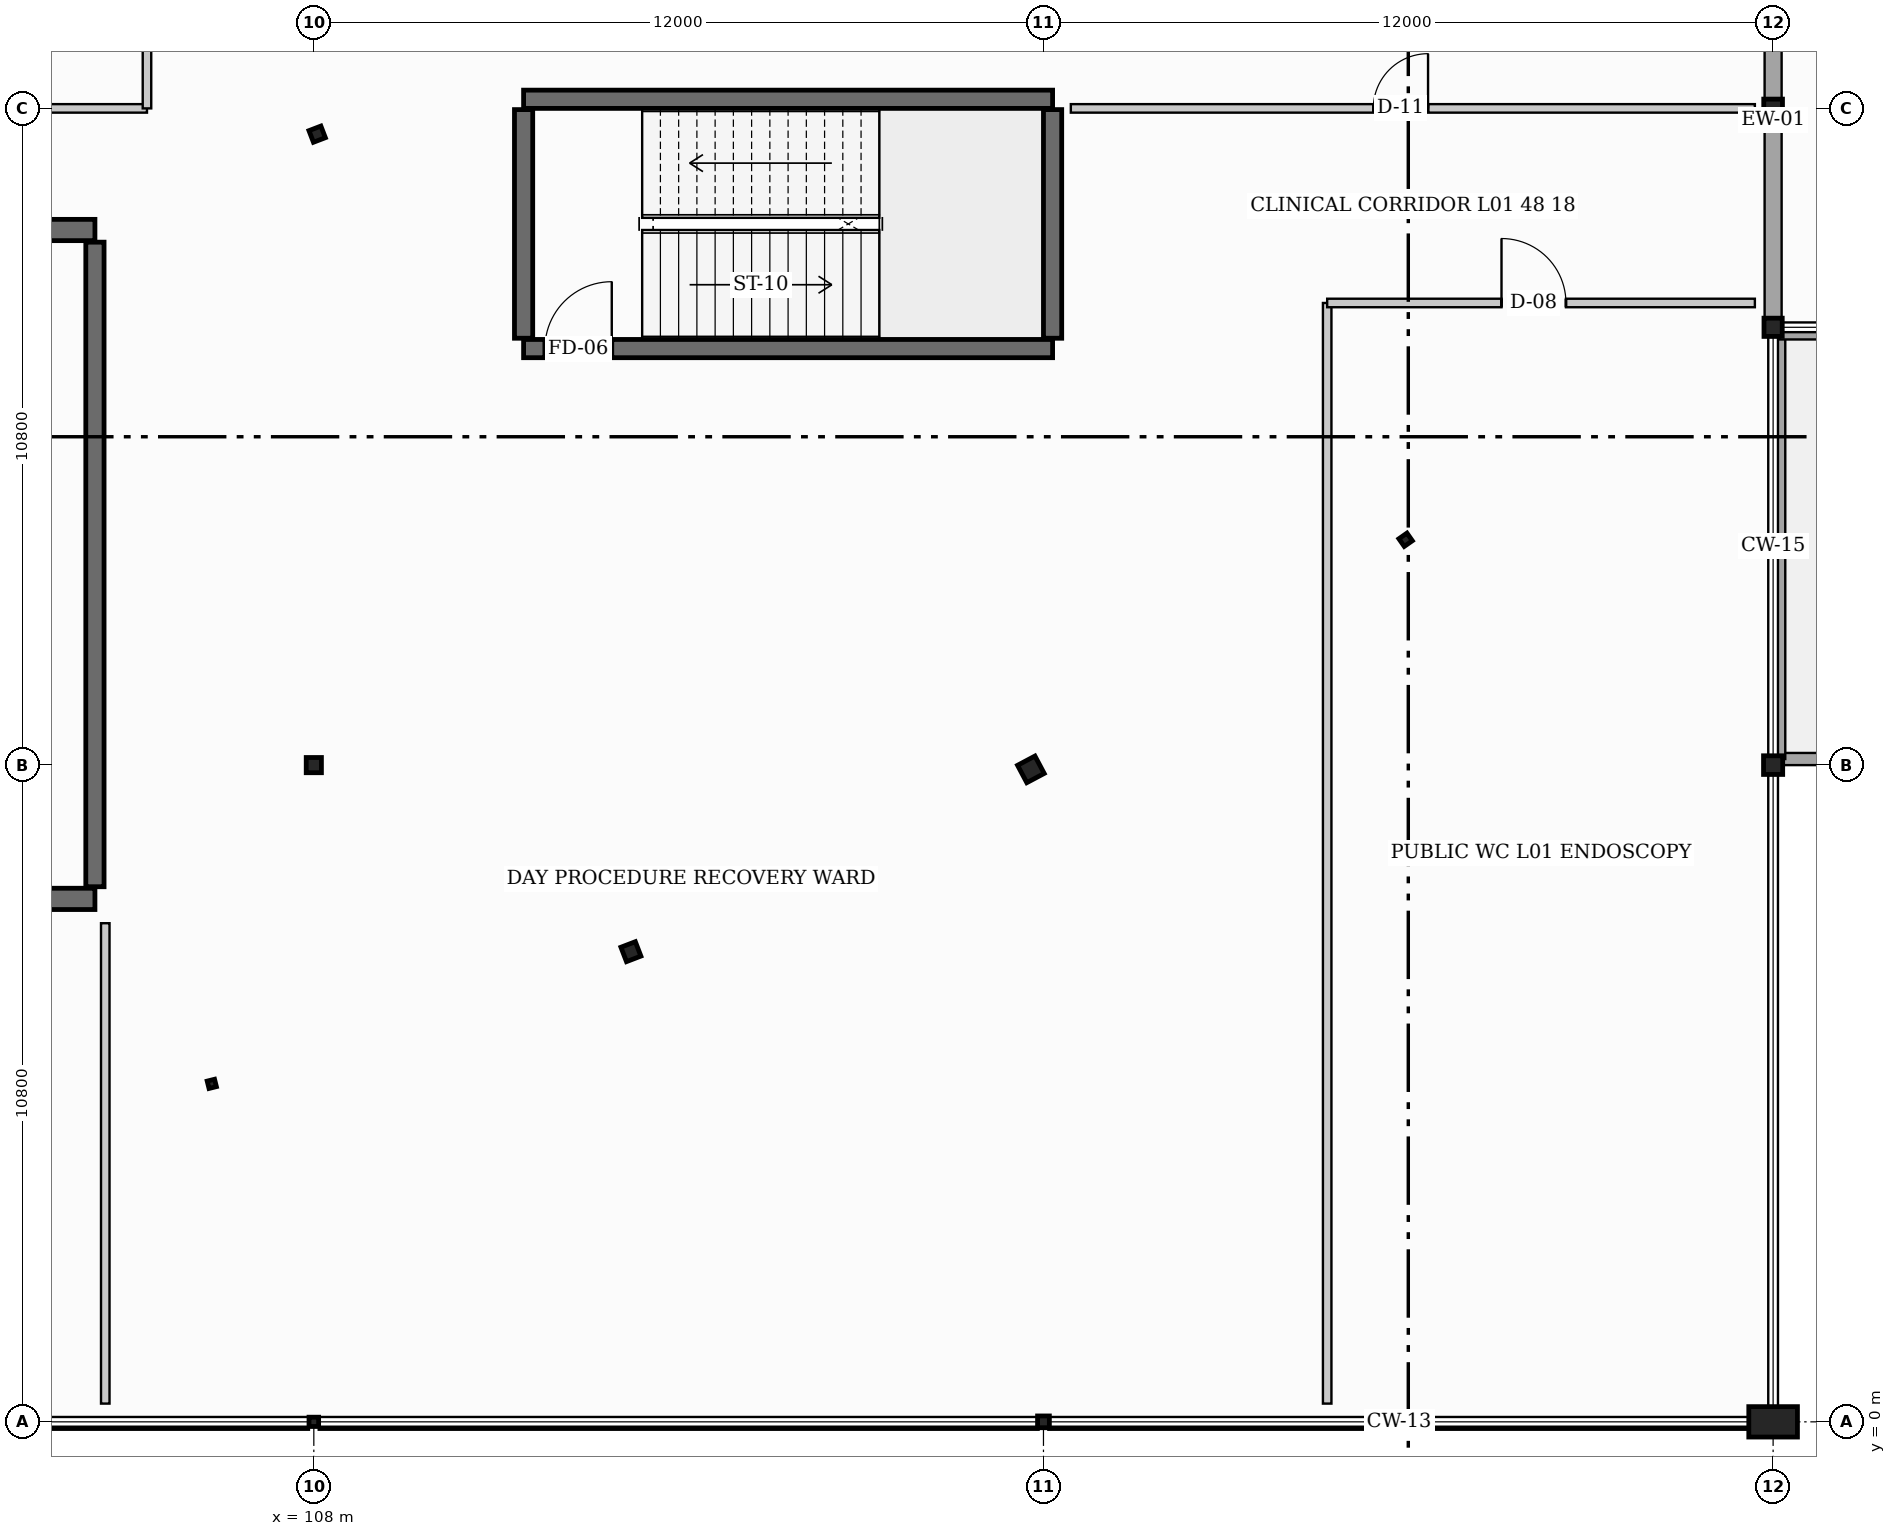
"""IFC4 building model, lengths in metres.
Left out: names, types, materials, properties, quantities, classifications, styles, units other than length and angle.
Written with IfcOpenShell. Run it as: python <this file> out.ifc"""

import sys

from ifc_helpers import new_model, si_unit, direction, frame, frame_2d, origin, origin_2d, place, context, subcontext, project, spatial, rectangle, hollow_rectangle, hollow_circle, i_section, extrude, element, fill, save


model = new_model("IFC4")
c1 = context("Model", 3, precision=1e-05, world=origin(), true_north=direction((0.0, 1.0)))
c2 = subcontext(c1, "Body", "Model", "MODEL_VIEW")
j1 = project(units=[si_unit("LENGTHUNIT", "METRE"), si_unit("PLANEANGLEUNIT", "RADIAN")], contexts=[c1])
p1 = place(None, origin())
s1 = spatial("IfcSite", under=j1, at=p1, CompositionType="ELEMENT")
p2 = place(p1, origin())
s2 = spatial("IfcBuilding", under=s1, at=p2, CompositionType="ELEMENT")
p3 = place(p2, frame((0.0, 0.0, 4.8)))
s3 = spatial("IfcBuildingStorey", under=s2, at=p3, CompositionType="ELEMENT", Elevation=4.8)
p4 = place(p3, frame((108.0, 0.0, 0.0), z_axis=(0.0, 0.0, 1.0), x_axis=(0.0, 1.0, 0.0)))
e1 = element("IfcColumn", 1, at=p4, inside=s3, PredefinedType="COLUMN", context=c2, shape_type="SweptSolid", body=[
    extrude(i_section(OverallWidth=0.153, OverallDepth=0.158, WebThickness=0.007, FlangeThickness=0.01, at=origin_2d()), origin(), (0.0, 0.0, 1.0), 4.8),
])
p5 = place(p3, frame((108.0, 10.8, 0.0), z_axis=(0.0, 0.0, 1.0), x_axis=(0.0, 1.0, 0.0)))
e2 = element("IfcColumn", 2, at=p5, inside=s3, PredefinedType="COLUMN", context=c2, shape_type="SweptSolid", body=[
    extrude(hollow_rectangle(XDim=0.25, YDim=0.25, WallThickness=0.012, at=origin_2d()), origin(), (0.0, 0.0, 1.0), 4.8),
])
p6 = place(p3, frame((120.0, 0.0, 0.0), z_axis=(0.0, 0.0, 1.0), x_axis=(1.0, 0.0, 0.0)))
e3 = element("IfcColumn", 3, at=p6, inside=s3, PredefinedType="COLUMN", context=c2, shape_type="SweptSolid", body=[
    extrude(hollow_circle(Radius=0.097, WallThickness=0.008, at=origin_2d()), origin(), (0.0, 0.0, 1.0), 4.8),
])
p7 = place(p3, frame((132.0, 0.0, 0.0), z_axis=(0.0, 0.0, 1.0), x_axis=(0.0, 1.0, 0.0)))
e4 = element("IfcColumn", 4, at=p7, inside=s3, PredefinedType="PILASTER", context=c2, shape_type="SweptSolid", body=[
    extrude(rectangle(XDim=0.5, YDim=0.8, at=origin_2d()), origin(), (0.0, 0.0, 1.0), 4.8),
])
p8 = place(p3, frame((132.0, 10.8, 0.0), z_axis=(0.0, 0.0, 1.0), x_axis=(0.0, 1.0, 0.0)))
e5 = element("IfcColumn", 5, at=p8, inside=s3, PredefinedType="COLUMN", context=c2, shape_type="SweptSolid", body=[
    extrude(i_section(OverallWidth=0.307, OverallDepth=0.315, WebThickness=0.012, FlangeThickness=0.019, at=origin_2d()), origin(), (0.0, 0.0, 1.0), 4.8),
])
p9 = place(p3, frame((132.0, 21.6, 0.0), z_axis=(0.0, 0.0, 1.0), x_axis=(0.0, 1.0, 0.0)))
e6 = element("IfcColumn", 6, at=p9, inside=s3, PredefinedType="COLUMN", context=c2, shape_type="SweptSolid", body=[
    extrude(i_section(OverallWidth=0.305, OverallDepth=0.308, WebThickness=0.01, FlangeThickness=0.015, at=origin_2d()), origin(), (0.0, 0.0, 1.0), 4.8),
])
p10 = place(p3, frame((106.322, 5.558, 0.0), z_axis=(0.0, 0.0, 1.0), x_axis=(-0.2419218956, 0.970295726276, 0.0)))
e7 = element("IfcColumn", 7, at=p10, inside=s3, PredefinedType="COLUMN", context=c2, shape_type="SweptSolid", body=[
    extrude(hollow_rectangle(XDim=0.125, YDim=0.125, WallThickness=0.006, at=origin_2d()), origin(), (0.0, 0.0, 1.0), 4.8),
])
p11 = place(p3, frame((113.215, 7.732, 0.0), z_axis=(0.0, 0.0, 1.0), x_axis=(-0.358367949545, 0.933580426497, 0.0)))
e8 = element("IfcColumn", 8, at=p11, inside=s3, PredefinedType="COLUMN", context=c2, shape_type="SweptSolid", body=[
    extrude(i_section(OverallWidth=0.254, OverallDepth=0.254, WebThickness=0.009, FlangeThickness=0.014, at=origin_2d()), origin(), (0.0, 0.0, 1.0), 4.8),
])
p12 = place(p3, frame((108.055, 21.176, 0.0), z_axis=(0.0, 0.0, 1.0), x_axis=(-0.358367949545, 0.933580426497, 0.0)))
e9 = element("IfcColumn", 9, at=p12, inside=s3, PredefinedType="COLUMN", context=c2, shape_type="SweptSolid", body=[
    extrude(i_section(OverallWidth=0.205, OverallDepth=0.21, WebThickness=0.009, FlangeThickness=0.014, at=origin_2d()), origin(), (0.0, 0.0, 1.0), 4.8),
])
p13 = place(p3, frame((119.793, 10.73, 0.0), z_axis=(0.0, 0.0, 1.0), x_axis=(-0.469471562786, 0.882947592859, 0.0)))
e10 = element("IfcColumn", 10, at=p13, inside=s3, PredefinedType="COLUMN", context=c2, shape_type="SweptSolid", body=[
    extrude(hollow_circle(Radius=0.162, WallThickness=0.013, at=origin_2d()), origin(), (0.0, 0.0, 1.0), 4.8),
])
p14 = place(p3, frame((125.956, 14.506, 0.0), z_axis=(0.0, 0.0, 1.0), x_axis=(-0.573576436351, 0.819152044289, 0.0)))
e11 = element("IfcColumn", 11, at=p14, inside=s3, PredefinedType="COLUMN", context=c2, shape_type="SweptSolid", body=[
    extrude(i_section(OverallWidth=0.154, OverallDepth=0.162, WebThickness=0.008, FlangeThickness=0.011, at=origin_2d()), origin(), (0.0, 0.0, 1.0), 4.8),
])
p15 = place(p3, frame((132.0, 18.0, 0.0), z_axis=(0.0, 0.0, 1.0), x_axis=(1.0, 0.0, 0.0)))
e12 = element("IfcColumn", 12, at=p15, inside=s3, PredefinedType="COLUMN", context=c2, shape_type="SweptSolid", body=[
    extrude(hollow_rectangle(XDim=0.3, YDim=0.3, WallThickness=0.012, at=origin_2d()), origin(), (0.0, 0.0, 1.0), 4.8),
])
p16 = place(p3, frame((84.0, 19.6, 0.0), z_axis=(0.0, 0.0, 1.0), x_axis=(1.0, 0.0, 0.0)))
e13 = element("IfcWall", 13, at=p16, inside=s3, PredefinedType="SHEAR", context=c2, shape_type="SweptSolid", body=[
    extrude(rectangle(XDim=20.4, YDim=0.35, at=frame_2d((10.2, 0.0))), origin(), (0.0, 0.0, 1.0), 4.8),
])
p17 = place(p3, frame((104.4, 8.6, 0.0), z_axis=(0.0, 0.0, 1.0), x_axis=(-1.0, 0.0, 0.0)))
e14 = element("IfcWall", 14, at=p17, inside=s3, PredefinedType="SHEAR", context=c2, shape_type="SweptSolid", body=[
    extrude(rectangle(XDim=20.4, YDim=0.35, at=frame_2d((10.2, 0.0))), origin(), (0.0, 0.0, 1.0), 4.8),
])
p18 = place(p17, frame((2.2, 0.0, 0.0)))
e15 = element("IfcOpeningElement", 15, at=p18, cuts=e14, PredefinedType="OPENING", context=c2, shape_type="SweptSolid", body=[
    extrude(rectangle(XDim=1.64, YDim=2.2, at=frame_2d((0.82, 1.1))), frame((0.0, 0.185, 0.0), z_axis=(0.0, -1.0, 0.0), x_axis=(1.0, 0.0, 0.0)), (0.0, 0.0, 1.0), 0.37),
])
p19 = place(p17, frame((13.0, 0.0, 0.0)))
e16 = element("IfcOpeningElement", 16, at=p19, cuts=e14, PredefinedType="OPENING", context=c2, shape_type="SweptSolid", body=[
    extrude(rectangle(XDim=1.52, YDim=2.16, at=frame_2d((0.76, 1.08))), frame((0.0, 0.185, 0.0), z_axis=(0.0, -1.0, 0.0), x_axis=(1.0, 0.0, 0.0)), (0.0, 0.0, 1.0), 0.37),
])
p20 = place(p3, frame((104.4, 19.4, 0.0), z_axis=(0.0, 0.0, 1.0), x_axis=(0.0, -1.0, 0.0)))
e17 = element("IfcWall", 17, at=p20, inside=s3, PredefinedType="SHEAR", context=c2, shape_type="SweptSolid", body=[
    extrude(rectangle(XDim=10.6, YDim=0.3, at=frame_2d((5.3, 0.0))), origin(), (0.0, 0.0, 1.0), 4.8),
])
p21 = place(p3, frame((111.45, 17.65, 0.0), z_axis=(0.0, 0.0, 1.0), x_axis=(1.0, 0.0, 0.0)))
e18 = element("IfcWall", 18, at=p21, inside=s3, PredefinedType="SHEAR", context=c2, shape_type="SweptSolid", body=[
    extrude(rectangle(XDim=8.7, YDim=0.3, at=frame_2d((4.35, 0.0))), origin(), (0.0, 0.0, 1.0), 4.8),
])
p22 = place(p21, frame((0.35, 0.0, 0.0)))
e19 = element("IfcOpeningElement", 19, at=p22, cuts=e18, PredefinedType="OPENING", context=c2, shape_type="SweptSolid", body=[
    extrude(rectangle(XDim=1.1, YDim=2.15, at=frame_2d((0.55, 1.075))), frame((0.0, 0.16, 0.0), z_axis=(0.0, -1.0, 0.0), x_axis=(1.0, 0.0, 0.0)), (0.0, 0.0, 1.0), 0.32),
])
p23 = place(p3, frame((120.15, 21.75, 0.0), z_axis=(0.0, 0.0, 1.0), x_axis=(-1.0, 0.0, 0.0)))
e20 = element("IfcWall", 20, at=p23, inside=s3, PredefinedType="SHEAR", context=c2, shape_type="SweptSolid", body=[
    extrude(rectangle(XDim=8.7, YDim=0.3, at=frame_2d((4.35, 0.0))), origin(), (0.0, 0.0, 1.0), 4.8),
])
for number, where, z_axis, x_axis in (
    (21, (111.45, 17.82, 0.0), (0.0, 0.0, 1.0), (0.0, 1.0, 0.0)),
    (22, (120.15, 17.82, 0.0), (0.0, 0.0, 1.0), (0.0, 1.0, 0.0)),
):
    element("IfcWall", number, at=place(p3, frame(where, z_axis=z_axis, x_axis=x_axis)), inside=s3, PredefinedType="SHEAR", context=c2, shape_type="SweptSolid", body=[
        extrude(rectangle(XDim=3.76, YDim=0.3, at=frame_2d((1.88, 0.0))), origin(), (0.0, 0.0, 1.0), 4.8),
    ])
p24 = place(p3, frame((132.0, 27.6, 0.0), z_axis=(0.0, 0.0, 1.0), x_axis=(0.0, -1.0, 0.0)))
e23 = element("IfcWall", 23, at=p24, inside=s3, PredefinedType="STANDARD", context=c2, shape_type="SweptSolid", body=[
    extrude(rectangle(XDim=9.6, YDim=0.28, at=frame_2d((4.8, 0.0))), origin(), (0.0, 0.0, 1.0), 3.738),
])
p25 = place(p24, frame((0.681, 0.0, 0.0)))
e24 = element("IfcOpeningElement", 24, at=p25, cuts=e23, PredefinedType="OPENING", context=c2, shape_type="SweptSolid", body=[
    extrude(rectangle(XDim=2.1, YDim=2.25, at=frame_2d((1.05, 1.125))), frame((0.0, 0.15, 0.0), z_axis=(0.0, -1.0, 0.0), x_axis=(1.0, 0.0, 0.0)), (0.0, 0.0, 1.0), 0.3),
])
p26 = place(p3, frame((143.9, 10.9, 0.31), z_axis=(0.0, 0.0, 1.0), x_axis=(-1.0, 0.0, 0.0)))
e25 = element("IfcWall", 25, at=p26, inside=s3, PredefinedType="PARAPET", context=c2, shape_type="SweptSolid", body=[
    extrude(rectangle(XDim=11.8, YDim=0.2, at=frame_2d((5.9, 0.0))), origin(), (0.0, 0.0, 1.0), 1.12),
])
p27 = place(p3, frame((132.1, 10.9, 0.31), z_axis=(0.0, 0.0, 1.0), x_axis=(0.0, 1.0, 0.0)))
e26 = element("IfcWall", 26, at=p27, inside=s3, PredefinedType="PARAPET", context=c2, shape_type="SweptSolid", body=[
    extrude(rectangle(XDim=7.0, YDim=0.2, at=frame_2d((3.5, 0.0))), origin(), (0.0, 0.0, 1.0), 1.12),
])
p28 = place(p3, frame((132.1, 17.9, 0.31), z_axis=(0.0, 0.0, 1.0), x_axis=(1.0, 0.0, 0.0)))
e27 = element("IfcWall", 27, at=p28, inside=s3, PredefinedType="PARAPET", context=c2, shape_type="SweptSolid", body=[
    extrude(rectangle(XDim=11.8, YDim=0.2, at=frame_2d((5.9, 0.0))), origin(), (0.0, 0.0, 1.0), 1.12),
])
p29 = place(p3, frame((104.57, 0.3, 0.0), z_axis=(0.0, 0.0, 1.0), x_axis=(0.0, 1.0, 0.0)))
e28 = element("IfcWall", 28, at=p29, inside=s3, PredefinedType="PARTITIONING", context=c2, shape_type="SweptSolid", body=[
    extrude(rectangle(XDim=7.9, YDim=0.14, at=frame_2d((3.95, 0.0))), origin(), (0.0, 0.0, 1.0), 3.976),
])
p30 = place(p3, frame((124.666, 0.3, 0.0), z_axis=(0.0, 0.0, 1.0), x_axis=(0.0, 1.0, 0.0)))
e29 = element("IfcWall", 29, at=p30, inside=s3, PredefinedType="PARTITIONING", context=c2, shape_type="SweptSolid", body=[
    extrude(rectangle(XDim=18.1, YDim=0.14, at=frame_2d((9.05, 0.0))), origin(), (0.0, 0.0, 1.0), 4.13),
])
p31 = place(p3, frame((124.666, 18.4, 0.0), z_axis=(0.0, 0.0, 1.0), x_axis=(1.0, 0.0, 0.0)))
e30 = element("IfcWall", 30, at=p31, inside=s3, PredefinedType="PARTITIONING", context=c2, shape_type="SweptSolid", body=[
    extrude(rectangle(XDim=7.034, YDim=0.14, at=frame_2d((3.517, 0.0))), origin(), (0.0, 0.0, 1.0), 3.738),
])
p32 = place(p31, frame((2.867, 0.0, 0.0)))
e31 = element("IfcOpeningElement", 31, at=p32, cuts=e30, PredefinedType="OPENING", context=c2, shape_type="SweptSolid", body=[
    extrude(rectangle(XDim=1.06, YDim=2.1, at=frame_2d((0.53, 1.05))), frame((0.0, 0.08, 0.0), z_axis=(0.0, -1.0, 0.0), x_axis=(1.0, 0.0, 0.0)), (0.0, 0.0, 1.0), 0.16),
])
p33 = place(p3, frame((76.778, 21.6, 0.0), z_axis=(0.0, 0.0, 1.0), x_axis=(1.0, 0.0, 0.0)))
e32 = element("IfcWall", 32, at=p33, inside=s3, PredefinedType="PARTITIONING", context=c2, shape_type="SweptSolid", body=[
    extrude(rectangle(XDim=28.478, YDim=0.14, at=frame_2d((14.239, 0.0))), origin(), (0.0, 0.0, 1.0), 3.53),
])
p34 = place(p33, frame((13.589, 0.0, 0.0)))
e33 = element("IfcOpeningElement", 33, at=p34, cuts=e32, PredefinedType="OPENING", context=c2, shape_type="SweptSolid", body=[
    extrude(rectangle(XDim=0.96, YDim=2.06, at=frame_2d((0.48, 1.03))), frame((0.0, 0.08, 0.0), z_axis=(0.0, -1.0, 0.0), x_axis=(1.0, 0.0, 0.0)), (0.0, 0.0, 1.0), 0.16),
])
p35 = place(p3, frame((105.256, 21.6, 0.0), z_axis=(0.0, 0.0, 1.0), x_axis=(0.0, 1.0, 0.0)))
e34 = element("IfcWall", 34, at=p35, inside=s3, PredefinedType="PARTITIONING", context=c2, shape_type="SweptSolid", body=[
    extrude(rectangle(XDim=23.7, YDim=0.14, at=frame_2d((11.85, 0.0))), origin(), (0.0, 0.0, 1.0), 3.53),
])
p36 = place(p3, frame((120.45, 21.6, 0.0), z_axis=(0.0, 0.0, 1.0), x_axis=(1.0, 0.0, 0.0)))
e35 = element("IfcWall", 35, at=p36, inside=s3, PredefinedType="PARTITIONING", context=c2, shape_type="SweptSolid", body=[
    extrude(rectangle(XDim=11.25, YDim=0.14, at=frame_2d((5.625, 0.0))), origin(), (0.0, 0.0, 1.0), 3.738),
])
p37 = place(p36, frame((4.975, 0.0, 0.0)))
e36 = element("IfcOpeningElement", 36, at=p37, cuts=e35, PredefinedType="OPENING", context=c2, shape_type="SweptSolid", body=[
    extrude(rectangle(XDim=0.9, YDim=2.1, at=frame_2d((0.45, 1.05))), frame((0.0, 0.08, 0.0), z_axis=(0.0, -1.0, 0.0), x_axis=(1.0, 0.0, 0.0)), (0.0, 0.0, 1.0), 0.16),
])
p38 = place(p22, origin())
e37 = element("IfcDoor", 37, at=p38, inside=s3, OperationType="SINGLE_SWING_RIGHT", PredefinedType="DOOR", context=c2, shape_type="SweptSolid", body=[
    extrude(rectangle(XDim=1.1, YDim=2.15, at=frame_2d((0.55, 1.075))), frame((0.0, 0.025, 0.0), z_axis=(0.0, -1.0, 0.0), x_axis=(1.0, 0.0, 0.0)), (0.0, 0.0, 1.0), 0.05),
])
fill(e19, e37)
p39 = place(p32, origin())
e38 = element("IfcDoor", 38, at=p39, inside=s3, OperationType="SINGLE_SWING_LEFT", PredefinedType="DOOR", context=c2, shape_type="SweptSolid", body=[
    extrude(rectangle(XDim=1.06, YDim=2.1, at=frame_2d((0.53, 1.05))), frame((0.0, 0.025, 0.0), z_axis=(0.0, -1.0, 0.0), x_axis=(1.0, 0.0, 0.0)), (0.0, 0.0, 1.0), 0.05),
])
fill(e31, e38)
p40 = place(p37, origin())
e39 = element("IfcDoor", 39, at=p40, inside=s3, OperationType="SINGLE_SWING_RIGHT", PredefinedType="DOOR", context=c2, shape_type="SweptSolid", body=[
    extrude(rectangle(XDim=0.9, YDim=2.1, at=frame_2d((0.45, 1.05))), frame((0.0, 0.025, 0.0), z_axis=(0.0, -1.0, 0.0), x_axis=(1.0, 0.0, 0.0)), (0.0, 0.0, 1.0), 0.05),
])
fill(e36, e39)
save(model, sys.argv[1])
